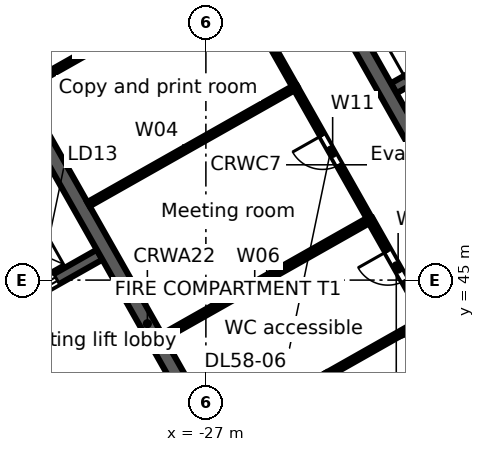
"""IFC4 building model, lengths in metres.
Left out: names, types, materials, properties, quantities, classifications, styles, units other than length and angle.
Written with IfcOpenShell. Run it as: python <this file> out.ifc"""

import sys

from ifc_helpers import new_model, si_unit, direction, frame, frame_2d, origin, place, context, subcontext, project, spatial, rectangle, extrude, element, fill, save


model = new_model("IFC4")
c1 = context("Model", 3, precision=1e-05, world=origin(), true_north=direction((0.0, 1.0)))
c2 = subcontext(c1, "Body", "Model", "MODEL_VIEW")
j1 = project(units=[si_unit("LENGTHUNIT", "METRE"), si_unit("PLANEANGLEUNIT", "RADIAN")], contexts=[c1])
p1 = place(None, origin())
s1 = spatial("IfcSite", under=j1, at=p1, CompositionType="ELEMENT")
p2 = place(p1, origin())
s2 = spatial("IfcBuilding", under=s1, at=p2, CompositionType="ELEMENT")
p3 = place(p2, frame((0.0, 0.0, 266.5)))
s3 = spatial("IfcBuildingStorey", under=s2, at=p3, CompositionType="ELEMENT", Elevation=266.5)
p4 = place(p3, frame((-58.732, 38.771, 0.0), z_axis=(0.0, 0.0, 1.0), x_axis=(0.870355615581, 0.492423702137, 0.0)))
e1 = element("IfcWall", 1, at=p4, inside=s3, PredefinedType="STANDARD", context=c2, shape_type="SweptSolid", body=[
    extrude(rectangle(XDim=64.052, YDim=0.25, at=frame_2d((32.026, 0.0))), origin(), (0.0, 0.0, 1.0), 3.52),
])
p5 = place(p4, frame((61.259, 0.0, 0.8)))
e2 = element("IfcOpeningElement", 2, at=p5, cuts=e1, PredefinedType="OPENING", context=c2, shape_type="SweptSolid", body=[
    extrude(rectangle(XDim=2.4, YDim=2.2, at=frame_2d((1.2, 1.1))), frame((0.0, 0.135, 0.0), z_axis=(0.0, -1.0, 0.0), x_axis=(1.0, 0.0, 0.0)), (0.0, 0.0, 1.0), 0.27),
])
p6 = place(p4, frame((58.216, 0.0, 0.8)))
e3 = element("IfcOpeningElement", 3, at=p6, cuts=e1, PredefinedType="OPENING", context=c2, shape_type="SweptSolid", body=[
    extrude(rectangle(XDim=2.4, YDim=2.2, at=frame_2d((1.2, 1.1))), frame((0.0, 0.135, 0.0), z_axis=(0.0, -1.0, 0.0), x_axis=(1.0, 0.0, 0.0)), (0.0, 0.0, 1.0), 0.27),
])
p7 = place(p4, frame((55.173, 0.0, 0.8)))
e4 = element("IfcOpeningElement", 4, at=p7, cuts=e1, PredefinedType="OPENING", context=c2, shape_type="SweptSolid", body=[
    extrude(rectangle(XDim=2.4, YDim=2.2, at=frame_2d((1.2, 1.1))), frame((0.0, 0.135, 0.0), z_axis=(0.0, -1.0, 0.0), x_axis=(1.0, 0.0, 0.0)), (0.0, 0.0, 1.0), 0.27),
])
p8 = place(p4, frame((52.129, 0.0, 0.8)))
e5 = element("IfcOpeningElement", 5, at=p8, cuts=e1, PredefinedType="OPENING", context=c2, shape_type="SweptSolid", body=[
    extrude(rectangle(XDim=2.4, YDim=2.2, at=frame_2d((1.2, 1.1))), frame((0.0, 0.135, 0.0), z_axis=(0.0, -1.0, 0.0), x_axis=(1.0, 0.0, 0.0)), (0.0, 0.0, 1.0), 0.27),
])
p9 = place(p4, frame((49.086, 0.0, 0.8)))
e6 = element("IfcOpeningElement", 6, at=p9, cuts=e1, PredefinedType="OPENING", context=c2, shape_type="SweptSolid", body=[
    extrude(rectangle(XDim=2.4, YDim=2.2, at=frame_2d((1.2, 1.1))), frame((0.0, 0.135, 0.0), z_axis=(0.0, -1.0, 0.0), x_axis=(1.0, 0.0, 0.0)), (0.0, 0.0, 1.0), 0.27),
])
p10 = place(p4, frame((46.043, 0.0, 0.8)))
e7 = element("IfcOpeningElement", 7, at=p10, cuts=e1, PredefinedType="OPENING", context=c2, shape_type="SweptSolid", body=[
    extrude(rectangle(XDim=2.4, YDim=2.2, at=frame_2d((1.2, 1.1))), frame((0.0, 0.135, 0.0), z_axis=(0.0, -1.0, 0.0), x_axis=(1.0, 0.0, 0.0)), (0.0, 0.0, 1.0), 0.27),
])
p11 = place(p4, frame((43.0, 0.0, 0.8)))
e8 = element("IfcOpeningElement", 8, at=p11, cuts=e1, PredefinedType="OPENING", context=c2, shape_type="SweptSolid", body=[
    extrude(rectangle(XDim=2.4, YDim=2.2, at=frame_2d((1.2, 1.1))), frame((0.0, 0.135, 0.0), z_axis=(0.0, -1.0, 0.0), x_axis=(1.0, 0.0, 0.0)), (0.0, 0.0, 1.0), 0.27),
])
p12 = place(p4, frame((39.956, 0.0, 0.8)))
e9 = element("IfcOpeningElement", 9, at=p12, cuts=e1, PredefinedType="OPENING", context=c2, shape_type="SweptSolid", body=[
    extrude(rectangle(XDim=2.4, YDim=2.2, at=frame_2d((1.2, 1.1))), frame((0.0, 0.135, 0.0), z_axis=(0.0, -1.0, 0.0), x_axis=(1.0, 0.0, 0.0)), (0.0, 0.0, 1.0), 0.27),
])
p13 = place(p4, frame((36.913, 0.0, 0.8)))
e10 = element("IfcOpeningElement", 10, at=p13, cuts=e1, PredefinedType="OPENING", context=c2, shape_type="SweptSolid", body=[
    extrude(rectangle(XDim=2.4, YDim=2.2, at=frame_2d((1.2, 1.1))), frame((0.0, 0.135, 0.0), z_axis=(0.0, -1.0, 0.0), x_axis=(1.0, 0.0, 0.0)), (0.0, 0.0, 1.0), 0.27),
])
p14 = place(p4, frame((33.87, 0.0, 0.8)))
e11 = element("IfcOpeningElement", 11, at=p14, cuts=e1, PredefinedType="OPENING", context=c2, shape_type="SweptSolid", body=[
    extrude(rectangle(XDim=2.4, YDim=2.2, at=frame_2d((1.2, 1.1))), frame((0.0, 0.135, 0.0), z_axis=(0.0, -1.0, 0.0), x_axis=(1.0, 0.0, 0.0)), (0.0, 0.0, 1.0), 0.27),
])
p15 = place(p4, frame((30.826, 0.0, 0.8)))
e12 = element("IfcOpeningElement", 12, at=p15, cuts=e1, PredefinedType="OPENING", context=c2, shape_type="SweptSolid", body=[
    extrude(rectangle(XDim=2.4, YDim=2.2, at=frame_2d((1.2, 1.1))), frame((0.0, 0.135, 0.0), z_axis=(0.0, -1.0, 0.0), x_axis=(1.0, 0.0, 0.0)), (0.0, 0.0, 1.0), 0.27),
])
p16 = place(p4, frame((27.783, 0.0, 0.8)))
e13 = element("IfcOpeningElement", 13, at=p16, cuts=e1, PredefinedType="OPENING", context=c2, shape_type="SweptSolid", body=[
    extrude(rectangle(XDim=2.4, YDim=2.2, at=frame_2d((1.2, 1.1))), frame((0.0, 0.135, 0.0), z_axis=(0.0, -1.0, 0.0), x_axis=(1.0, 0.0, 0.0)), (0.0, 0.0, 1.0), 0.27),
])
p17 = place(p4, frame((24.74, 0.0, 0.8)))
e14 = element("IfcOpeningElement", 14, at=p17, cuts=e1, PredefinedType="OPENING", context=c2, shape_type="SweptSolid", body=[
    extrude(rectangle(XDim=2.4, YDim=2.2, at=frame_2d((1.2, 1.1))), frame((0.0, 0.135, 0.0), z_axis=(0.0, -1.0, 0.0), x_axis=(1.0, 0.0, 0.0)), (0.0, 0.0, 1.0), 0.27),
])
p18 = place(p4, frame((21.696, 0.0, 0.8)))
e15 = element("IfcOpeningElement", 15, at=p18, cuts=e1, PredefinedType="OPENING", context=c2, shape_type="SweptSolid", body=[
    extrude(rectangle(XDim=2.4, YDim=2.2, at=frame_2d((1.2, 1.1))), frame((0.0, 0.135, 0.0), z_axis=(0.0, -1.0, 0.0), x_axis=(1.0, 0.0, 0.0)), (0.0, 0.0, 1.0), 0.27),
])
p19 = place(p4, frame((18.653, 0.0, 0.8)))
e16 = element("IfcOpeningElement", 16, at=p19, cuts=e1, PredefinedType="OPENING", context=c2, shape_type="SweptSolid", body=[
    extrude(rectangle(XDim=2.4, YDim=2.2, at=frame_2d((1.2, 1.1))), frame((0.0, 0.135, 0.0), z_axis=(0.0, -1.0, 0.0), x_axis=(1.0, 0.0, 0.0)), (0.0, 0.0, 1.0), 0.27),
])
p20 = place(p4, frame((15.61, 0.0, 0.8)))
e17 = element("IfcOpeningElement", 17, at=p20, cuts=e1, PredefinedType="OPENING", context=c2, shape_type="SweptSolid", body=[
    extrude(rectangle(XDim=2.4, YDim=2.2, at=frame_2d((1.2, 1.1))), frame((0.0, 0.135, 0.0), z_axis=(0.0, -1.0, 0.0), x_axis=(1.0, 0.0, 0.0)), (0.0, 0.0, 1.0), 0.27),
])
p21 = place(p4, frame((12.567, 0.0, 0.8)))
e18 = element("IfcOpeningElement", 18, at=p21, cuts=e1, PredefinedType="OPENING", context=c2, shape_type="SweptSolid", body=[
    extrude(rectangle(XDim=2.4, YDim=2.2, at=frame_2d((1.2, 1.1))), frame((0.0, 0.135, 0.0), z_axis=(0.0, -1.0, 0.0), x_axis=(1.0, 0.0, 0.0)), (0.0, 0.0, 1.0), 0.27),
])
p22 = place(p4, frame((9.523, 0.0, 0.8)))
e19 = element("IfcOpeningElement", 19, at=p22, cuts=e1, PredefinedType="OPENING", context=c2, shape_type="SweptSolid", body=[
    extrude(rectangle(XDim=2.4, YDim=2.2, at=frame_2d((1.2, 1.1))), frame((0.0, 0.135, 0.0), z_axis=(0.0, -1.0, 0.0), x_axis=(1.0, 0.0, 0.0)), (0.0, 0.0, 1.0), 0.27),
])
p23 = place(p4, frame((6.48, 0.0, 0.8)))
e20 = element("IfcOpeningElement", 20, at=p23, cuts=e1, PredefinedType="OPENING", context=c2, shape_type="SweptSolid", body=[
    extrude(rectangle(XDim=2.4, YDim=2.2, at=frame_2d((1.2, 1.1))), frame((0.0, 0.135, 0.0), z_axis=(0.0, -1.0, 0.0), x_axis=(1.0, 0.0, 0.0)), (0.0, 0.0, 1.0), 0.27),
])
p24 = place(p4, frame((3.437, 0.0, 0.8)))
e21 = element("IfcOpeningElement", 21, at=p24, cuts=e1, PredefinedType="OPENING", context=c2, shape_type="SweptSolid", body=[
    extrude(rectangle(XDim=2.4, YDim=2.2, at=frame_2d((1.2, 1.1))), frame((0.0, 0.135, 0.0), z_axis=(0.0, -1.0, 0.0), x_axis=(1.0, 0.0, 0.0)), (0.0, 0.0, 1.0), 0.27),
])
p25 = place(p4, frame((0.393, 0.0, 0.8)))
e22 = element("IfcOpeningElement", 22, at=p25, cuts=e1, PredefinedType="OPENING", context=c2, shape_type="SweptSolid", body=[
    extrude(rectangle(XDim=2.4, YDim=2.2, at=frame_2d((1.2, 1.1))), frame((0.0, 0.135, 0.0), z_axis=(0.0, -1.0, 0.0), x_axis=(1.0, 0.0, 0.0)), (0.0, 0.0, 1.0), 0.27),
])
p26 = place(p3, frame((-3.017, 46.293, 0.0), z_axis=(0.0, 0.0, 1.0), x_axis=(-0.870355474887, -0.492423950812, 0.0)))
e23 = element("IfcWall", 23, at=p26, inside=s3, PredefinedType="STANDARD", context=c2, shape_type="SweptSolid", body=[
    extrude(rectangle(XDim=40.34, YDim=0.25, at=frame_2d((20.17, 0.0))), origin(), (0.0, 0.0, 1.0), 3.52),
])
p27 = place(p26, frame((37.428, 0.0, 0.8)))
e24 = element("IfcOpeningElement", 24, at=p27, cuts=e23, PredefinedType="OPENING", context=c2, shape_type="SweptSolid", body=[
    extrude(rectangle(XDim=2.4, YDim=2.2, at=frame_2d((1.2, 1.1))), frame((0.0, 0.135, 0.0), z_axis=(0.0, -1.0, 0.0), x_axis=(1.0, 0.0, 0.0)), (0.0, 0.0, 1.0), 0.27),
])
p28 = place(p26, frame((34.372, 0.0, 0.0)))
e25 = element("IfcOpeningElement", 25, at=p28, cuts=e23, PredefinedType="OPENING", context=c2, shape_type="SweptSolid", body=[
    extrude(rectangle(XDim=1.8, YDim=2.4, at=frame_2d((0.9, 1.2))), frame((0.0, 0.135, 0.0), z_axis=(0.0, -1.0, 0.0), x_axis=(1.0, 0.0, 0.0)), (0.0, 0.0, 1.0), 0.27),
])
p29 = place(p26, frame((30.716, 0.0, 0.8)))
e26 = element("IfcOpeningElement", 26, at=p29, cuts=e23, PredefinedType="OPENING", context=c2, shape_type="SweptSolid", body=[
    extrude(rectangle(XDim=2.4, YDim=2.2, at=frame_2d((1.2, 1.1))), frame((0.0, 0.135, 0.0), z_axis=(0.0, -1.0, 0.0), x_axis=(1.0, 0.0, 0.0)), (0.0, 0.0, 1.0), 0.27),
])
p30 = place(p26, frame((27.36, 0.0, 0.8)))
e27 = element("IfcOpeningElement", 27, at=p30, cuts=e23, PredefinedType="OPENING", context=c2, shape_type="SweptSolid", body=[
    extrude(rectangle(XDim=2.4, YDim=2.2, at=frame_2d((1.2, 1.1))), frame((0.0, 0.135, 0.0), z_axis=(0.0, -1.0, 0.0), x_axis=(1.0, 0.0, 0.0)), (0.0, 0.0, 1.0), 0.27),
])
p31 = place(p26, frame((24.304, 0.0, 0.0)))
e28 = element("IfcOpeningElement", 28, at=p31, cuts=e23, PredefinedType="OPENING", context=c2, shape_type="SweptSolid", body=[
    extrude(rectangle(XDim=1.8, YDim=2.4, at=frame_2d((0.9, 1.2))), frame((0.0, 0.135, 0.0), z_axis=(0.0, -1.0, 0.0), x_axis=(1.0, 0.0, 0.0)), (0.0, 0.0, 1.0), 0.27),
])
p32 = place(p26, frame((20.648, 0.0, 0.8)))
e29 = element("IfcOpeningElement", 29, at=p32, cuts=e23, PredefinedType="OPENING", context=c2, shape_type="SweptSolid", body=[
    extrude(rectangle(XDim=2.4, YDim=2.2, at=frame_2d((1.2, 1.1))), frame((0.0, 0.135, 0.0), z_axis=(0.0, -1.0, 0.0), x_axis=(1.0, 0.0, 0.0)), (0.0, 0.0, 1.0), 0.27),
])
p33 = place(p26, frame((17.292, 0.0, 0.8)))
e30 = element("IfcOpeningElement", 30, at=p33, cuts=e23, PredefinedType="OPENING", context=c2, shape_type="SweptSolid", body=[
    extrude(rectangle(XDim=2.4, YDim=2.2, at=frame_2d((1.2, 1.1))), frame((0.0, 0.135, 0.0), z_axis=(0.0, -1.0, 0.0), x_axis=(1.0, 0.0, 0.0)), (0.0, 0.0, 1.0), 0.27),
])
p34 = place(p26, frame((14.236, 0.0, 0.0)))
e31 = element("IfcOpeningElement", 31, at=p34, cuts=e23, PredefinedType="OPENING", context=c2, shape_type="SweptSolid", body=[
    extrude(rectangle(XDim=1.8, YDim=2.4, at=frame_2d((0.9, 1.2))), frame((0.0, 0.135, 0.0), z_axis=(0.0, -1.0, 0.0), x_axis=(1.0, 0.0, 0.0)), (0.0, 0.0, 1.0), 0.27),
])
p35 = place(p26, frame((10.58, 0.0, 0.8)))
e32 = element("IfcOpeningElement", 32, at=p35, cuts=e23, PredefinedType="OPENING", context=c2, shape_type="SweptSolid", body=[
    extrude(rectangle(XDim=2.4, YDim=2.2, at=frame_2d((1.2, 1.1))), frame((0.0, 0.135, 0.0), z_axis=(0.0, -1.0, 0.0), x_axis=(1.0, 0.0, 0.0)), (0.0, 0.0, 1.0), 0.27),
])
p36 = place(p26, frame((7.224, 0.0, 0.8)))
e33 = element("IfcOpeningElement", 33, at=p36, cuts=e23, PredefinedType="OPENING", context=c2, shape_type="SweptSolid", body=[
    extrude(rectangle(XDim=2.4, YDim=2.2, at=frame_2d((1.2, 1.1))), frame((0.0, 0.135, 0.0), z_axis=(0.0, -1.0, 0.0), x_axis=(1.0, 0.0, 0.0)), (0.0, 0.0, 1.0), 0.27),
])
p37 = place(p26, frame((4.168, 0.0, 0.0)))
e34 = element("IfcOpeningElement", 34, at=p37, cuts=e23, PredefinedType="OPENING", context=c2, shape_type="SweptSolid", body=[
    extrude(rectangle(XDim=1.8, YDim=2.4, at=frame_2d((0.9, 1.2))), frame((0.0, 0.135, 0.0), z_axis=(0.0, -1.0, 0.0), x_axis=(1.0, 0.0, 0.0)), (0.0, 0.0, 1.0), 0.27),
])
p38 = place(p26, frame((0.512, 0.0, 0.8)))
e35 = element("IfcOpeningElement", 35, at=p38, cuts=e23, PredefinedType="OPENING", context=c2, shape_type="SweptSolid", body=[
    extrude(rectangle(XDim=2.4, YDim=2.2, at=frame_2d((1.2, 1.1))), frame((0.0, 0.135, 0.0), z_axis=(0.0, -1.0, 0.0), x_axis=(1.0, 0.0, 0.0)), (0.0, 0.0, 1.0), 0.27),
])
p39 = place(p3, frame((-37.282, 41.435, 0.0), z_axis=(0.0, 0.0, 1.0), x_axis=(0.870361315115, 0.492413628113, 0.0)))
e36 = element("IfcWall", 36, at=p39, inside=s3, PredefinedType="SOLIDWALL", context=c2, shape_type="SweptSolid", body=[
    extrude(rectangle(XDim=8.6, YDim=0.3, at=frame_2d((4.3, 0.0))), origin(), (0.0, 0.0, 1.0), 3.52),
])
p40 = place(p39, frame((0.65, 0.0, 0.0)))
e37 = element("IfcOpeningElement", 37, at=p40, cuts=e36, PredefinedType="OPENING", context=c2, shape_type="SweptSolid", body=[
    extrude(rectangle(XDim=1.1, YDim=2.1, at=frame_2d((0.55, 1.05))), frame((0.0, 0.16, 0.0), z_axis=(0.0, -1.0, 0.0), x_axis=(1.0, 0.0, 0.0)), (0.0, 0.0, 1.0), 0.32),
])
p41 = place(p39, frame((3.05, 0.0, 0.0)))
e38 = element("IfcOpeningElement", 38, at=p41, cuts=e36, PredefinedType="OPENING", context=c2, shape_type="SweptSolid", body=[
    extrude(rectangle(XDim=1.1, YDim=2.1, at=frame_2d((0.55, 1.05))), frame((0.0, 0.16, 0.0), z_axis=(0.0, -1.0, 0.0), x_axis=(1.0, 0.0, 0.0)), (0.0, 0.0, 1.0), 0.32),
])
p42 = place(p39, frame((6.2, 0.0, 0.0)))
e39 = element("IfcOpeningElement", 39, at=p42, cuts=e36, PredefinedType="OPENING", context=c2, shape_type="SweptSolid", body=[
    extrude(rectangle(XDim=1.1, YDim=2.1, at=frame_2d((0.55, 1.05))), frame((0.0, 0.16, 0.0), z_axis=(0.0, -1.0, 0.0), x_axis=(1.0, 0.0, 0.0)), (0.0, 0.0, 1.0), 0.32),
])
p43 = place(p3, frame((-33.031, 43.667, 0.0), z_axis=(0.0, 0.0, 1.0), x_axis=(0.492408451753, -0.87036424366, 0.0)))
e40 = element("IfcWall", 40, at=p43, inside=s3, PredefinedType="PARTITIONING", context=c2, shape_type="SweptSolid", body=[
    extrude(rectangle(XDim=4.1, YDim=0.2, at=frame_2d((2.05, 0.0))), origin(), (0.0, 0.0, 1.0), 3.52),
])
p44 = place(p43, frame((1.55, 0.0, 0.0)))
e41 = element("IfcOpeningElement", 41, at=p44, cuts=e40, PredefinedType="OPENING", context=c2, shape_type="SweptSolid", body=[
    extrude(rectangle(XDim=1.0, YDim=2.1, at=frame_2d((0.5, 1.05))), frame((0.0, 0.11, 0.0), z_axis=(0.0, -1.0, 0.0), x_axis=(1.0, 0.0, 0.0)), (0.0, 0.0, 1.0), 0.22),
])
p45 = place(p3, frame((-31.79, 49.597, 0.0), z_axis=(0.0, 0.0, 1.0), x_axis=(0.492421663121, -0.870356769198, 0.0)))
e42 = element("IfcWall", 42, at=p45, inside=s3, PredefinedType="SOLIDWALL", context=c2, shape_type="SweptSolid", body=[
    extrude(rectangle(XDim=13.2, YDim=0.4, at=frame_2d((6.6, 0.0))), origin(), (0.0, 0.0, 1.0), 3.52),
])
p46 = place(p3, frame((-22.059, 50.047, 0.0), z_axis=(0.0, 0.0, 1.0), x_axis=(0.87035077051, 0.49243226567, 0.0)))
e43 = element("IfcWall", 43, at=p46, inside=s3, PredefinedType="SOLIDWALL", context=c2, shape_type="SweptSolid", body=[
    extrude(rectangle(XDim=7.4, YDim=0.3, at=frame_2d((3.7, 0.0))), origin(), (0.0, 0.0, 1.0), 3.52),
])
p47 = place(p46, frame((0.4, 0.0, 0.0)))
e44 = element("IfcOpeningElement", 44, at=p47, cuts=e43, PredefinedType="OPENING", context=c2, shape_type="SweptSolid", body=[
    extrude(rectangle(XDim=1.0, YDim=2.1, at=frame_2d((0.5, 1.05))), frame((0.0, 0.16, 0.0), z_axis=(0.0, -1.0, 0.0), x_axis=(1.0, 0.0, 0.0)), (0.0, 0.0, 1.0), 0.32),
])
p48 = place(p3, frame((-24.4, 53.779, 0.0), z_axis=(0.0, 0.0, 1.0), x_axis=(0.492421663121, -0.870356769198, 0.0)))
e45 = element("IfcWall", 45, at=p48, inside=s3, PredefinedType="SOLIDWALL", context=c2, shape_type="SweptSolid", body=[
    extrude(rectangle(XDim=13.2, YDim=0.4, at=frame_2d((6.6, 0.0))), origin(), (0.0, 0.0, 1.0), 3.52),
])
p49 = place(p3, frame((-31.812, 50.044, 0.0), z_axis=(0.0, 0.0, 1.0), x_axis=(0.870309075431, 0.492505952474, 0.0)))
e46 = element("IfcWall", 46, at=p49, inside=s3, PredefinedType="PARTITIONING", context=c2, shape_type="SweptSolid", body=[
    extrude(rectangle(XDim=4.5, YDim=0.125, at=frame_2d((2.25, 0.0))), origin(), (0.0, 0.0, 1.0), 3.52),
])
p50 = place(p3, frame((-30.089, 46.998, 0.0), z_axis=(0.0, 0.0, 1.0), x_axis=(0.870424575418, 0.492301796167, 0.0)))
e47 = element("IfcWall", 47, at=p50, inside=s3, PredefinedType="PARTITIONING", context=c2, shape_type="SweptSolid", body=[
    extrude(rectangle(XDim=6.25, YDim=0.125, at=frame_2d((3.125, 0.0))), origin(), (0.0, 0.0, 1.0), 3.52),
])
p51 = place(p3, frame((-28.119, 43.516, 0.0), z_axis=(0.0, 0.0, 1.0), x_axis=(0.870310250913, 0.49250387527, 0.0)))
e48 = element("IfcWall", 48, at=p51, inside=s3, PredefinedType="PARTITIONING", context=c2, shape_type="SweptSolid", body=[
    extrude(rectangle(XDim=6.25, YDim=0.15, at=frame_2d((3.125, 0.0))), origin(), (0.0, 0.0, 1.0), 2.792),
])
p52 = place(p3, frame((-26.373, 53.122, 0.0), z_axis=(0.0, 0.0, 1.0), x_axis=(0.492454723656, -0.870338063714, 0.0)))
e49 = element("IfcWall", 49, at=p52, inside=s3, PredefinedType="PARTITIONING", context=c2, shape_type="SweptSolid", body=[
    extrude(rectangle(XDim=3.501, YDim=0.125, at=frame_2d((1.75, 0.0))), origin(), (0.0, 0.0, 1.0), 3.52),
])
p53 = place(p52, frame((1.2, 0.0, 0.0)))
e50 = element("IfcOpeningElement", 50, at=p53, cuts=e49, PredefinedType="OPENING", context=c2, shape_type="SweptSolid", body=[
    extrude(rectangle(XDim=0.9, YDim=2.1, at=frame_2d((0.45, 1.05))), frame((0.0, 0.073, 0.0), z_axis=(0.0, -1.0, 0.0), x_axis=(1.0, 0.0, 0.0)), (0.0, 0.0, 1.0), 0.145),
])
p54 = place(p3, frame((-24.649, 50.075, 0.0), z_axis=(0.0, 0.0, 1.0), x_axis=(0.492340861121, -0.870402479587, 0.0)))
e51 = element("IfcWall", 51, at=p54, inside=s3, PredefinedType="PARTITIONING", context=c2, shape_type="SweptSolid", body=[
    extrude(rectangle(XDim=3.999, YDim=0.125, at=frame_2d((2.0, 0.0))), origin(), (0.0, 0.0, 1.0), 2.792),
])
p55 = place(p54, frame((1.45, 0.0, 0.0)))
e52 = element("IfcOpeningElement", 52, at=p55, cuts=e51, PredefinedType="OPENING", context=c2, shape_type="SweptSolid", body=[
    extrude(rectangle(XDim=0.9, YDim=2.1, at=frame_2d((0.45, 1.05))), frame((0.0, 0.073, 0.0), z_axis=(0.0, -1.0, 0.0), x_axis=(1.0, 0.0, 0.0)), (0.0, 0.0, 1.0), 0.145),
])
p56 = place(p3, frame((-23.813, 42.506, 0.0), z_axis=(0.0, 0.0, 1.0), x_axis=(0.870423351516, 0.492303960105, 0.0)))
e53 = element("IfcWall", 53, at=p56, inside=s3, PredefinedType="PARTITIONING", context=c2, shape_type="SweptSolid", body=[
    extrude(rectangle(XDim=3.0, YDim=0.125, at=frame_2d((1.5, 0.0))), origin(), (0.0, 0.0, 1.0), 3.52),
])
p57 = place(p3, frame((-22.68, 46.594, 0.0), z_axis=(0.0, 0.0, 1.0), x_axis=(0.492612172641, -0.870248957119, 0.0)))
e54 = element("IfcWall", 54, at=p57, inside=s3, PredefinedType="PARTITIONING", context=c2, shape_type="SweptSolid", body=[
    extrude(rectangle(XDim=3.0, YDim=0.15, at=frame_2d((1.5, 0.0))), origin(), (0.0, 0.0, 1.0), 3.52),
])
p58 = place(p57, frame((0.95, 0.0, 0.0)))
e55 = element("IfcOpeningElement", 55, at=p58, cuts=e54, PredefinedType="OPENING", context=c2, shape_type="SweptSolid", body=[
    extrude(rectangle(XDim=0.9, YDim=2.1, at=frame_2d((0.45, 1.05))), frame((0.0, 0.085, 0.0), z_axis=(0.0, -1.0, 0.0), x_axis=(1.0, 0.0, 0.0)), (0.0, 0.0, 1.0), 0.17),
])
p59 = place(p42, origin())
e56 = element("IfcDoor", 56, at=p59, inside=s3, OperationType="DOUBLE_DOOR_SLIDING", PredefinedType="DOOR", context=c2, shape_type="SweptSolid", body=[
    extrude(rectangle(XDim=1.1, YDim=2.1, at=frame_2d((0.55, 1.05))), frame((0.0, 0.025, 0.0), z_axis=(0.0, -1.0, 0.0), x_axis=(1.0, 0.0, 0.0)), (0.0, 0.0, 1.0), 0.05),
])
fill(e39, e56)
p60 = place(p58, frame((0.9, 0.0, 0.0), z_axis=(0.0, 0.0, 1.0), x_axis=(-1.0, 0.0, 0.0)))
e57 = element("IfcDoor", 57, at=p60, inside=s3, OperationType="SINGLE_SWING_RIGHT", PredefinedType="DOOR", context=c2, shape_type="SweptSolid", body=[
    extrude(rectangle(XDim=0.9, YDim=2.1, at=frame_2d((0.45, 1.05))), frame((0.0, 0.025, 0.0), z_axis=(0.0, -1.0, 0.0), x_axis=(1.0, 0.0, 0.0)), (0.0, 0.0, 1.0), 0.05),
])
fill(e55, e57)
p61 = place(p55, frame((0.9, 0.0, 0.0), z_axis=(0.0, 0.0, 1.0), x_axis=(-1.0, 0.0, 0.0)))
e58 = element("IfcDoor", 58, at=p61, inside=s3, OperationType="SINGLE_SWING_RIGHT", PredefinedType="DOOR", context=c2, shape_type="SweptSolid", body=[
    extrude(rectangle(XDim=0.9, YDim=2.1, at=frame_2d((0.45, 1.05))), frame((0.0, 0.025, 0.0), z_axis=(0.0, -1.0, 0.0), x_axis=(1.0, 0.0, 0.0)), (0.0, 0.0, 1.0), 0.05),
])
fill(e52, e58)
save(model, sys.argv[1])
